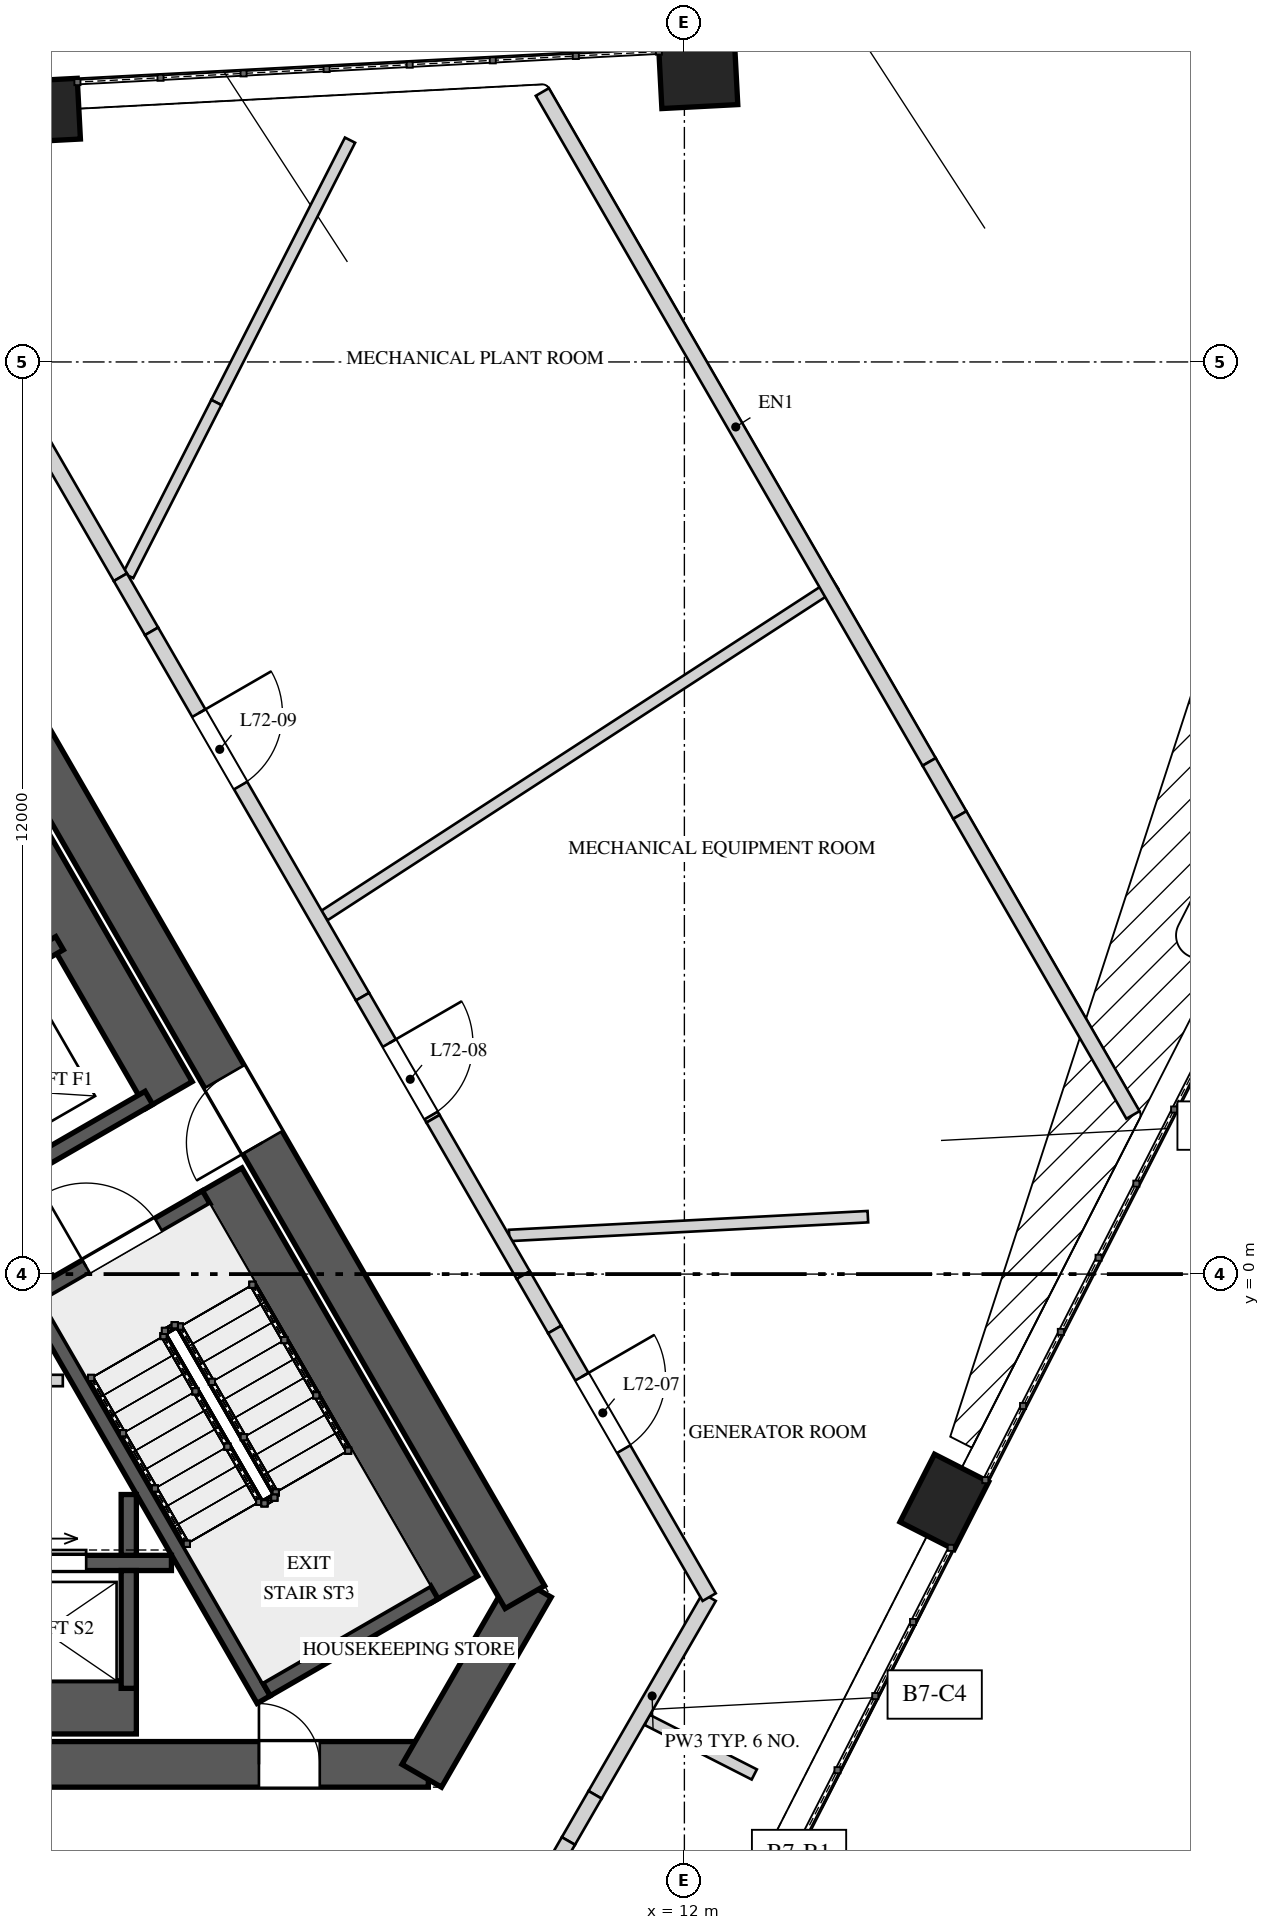
"""IFC4 building model, lengths in metres.
Left out: names, types, materials, properties, quantities, classifications, styles, units other than length and angle.
Written with IfcOpenShell. Run it as: python <this file> out.ifc"""

import sys

from ifc_helpers import new_model, si_unit, direction, frame, frame_2d, origin, origin_2d, place, context, subcontext, project, spatial, polyline, rectangle, outline, extrude, element, fill, save


model = new_model("IFC4")
c1 = context("Model", 3, precision=1e-05, world=origin(), true_north=direction((0.0, 1.0)))
c2 = subcontext(c1, "Body", "Model", "MODEL_VIEW")
j1 = project(units=[si_unit("LENGTHUNIT", "METRE"), si_unit("PLANEANGLEUNIT", "RADIAN")], contexts=[c1])
p1 = place(None, origin())
s1 = spatial("IfcSite", under=j1, at=p1, CompositionType="ELEMENT")
p2 = place(p1, origin())
s2 = spatial("IfcBuilding", under=s1, at=p2, CompositionType="ELEMENT")
p3 = place(p2, frame((0.0, 0.0, 306.4)))
s3 = spatial("IfcBuildingStorey", under=s2, at=p3, CompositionType="ELEMENT", Elevation=306.4)
p4 = place(p3, frame((-8.631, -6.45, 0.0), z_axis=(0.0, 0.0, 1.0), x_axis=(1.0, 0.0, 0.0)))
e1 = element("IfcWall", 1, at=p4, inside=s3, PredefinedType="SHEAR", context=c2, shape_type="SweptSolid", body=[
    extrude(rectangle(XDim=17.263, YDim=0.6, at=frame_2d((8.631, 0.0))), origin(), (0.0, 0.0, 1.0), 14.0),
])
p5 = place(p4, frame((6.836, 0.0, 0.0)))
e2 = element("IfcOpeningElement", 2, at=p5, cuts=e1, PredefinedType="OPENING", context=c2, shape_type="SweptSolid", body=[
    extrude(rectangle(XDim=1.0, YDim=2.4, at=frame_2d((0.5, 1.2))), frame((0.0, 0.31, 0.0), z_axis=(0.0, -1.0, 0.0), x_axis=(1.0, 0.0, 0.0)), (0.0, 0.0, 1.0), 0.62),
])
p6 = place(p4, frame((15.034, 0.0, 0.0)))
e3 = element("IfcOpeningElement", 3, at=p6, cuts=e1, PredefinedType="OPENING", context=c2, shape_type="SweptSolid", body=[
    extrude(rectangle(XDim=0.8, YDim=2.1, at=frame_2d((0.4, 1.05))), frame((0.0, 0.31, 0.0), z_axis=(0.0, -1.0, 0.0), x_axis=(1.0, 0.0, 0.0)), (0.0, 0.0, 1.0), 0.62),
])
p7 = place(p3, frame((8.545, -6.6, 0.0), z_axis=(0.0, 0.0, 1.0), x_axis=(0.499995765644, 0.866027848477, 0.0)))
e4 = element("IfcWall", 4, at=p7, inside=s3, PredefinedType="SHEAR", context=c2, shape_type="SweptSolid", body=[
    extrude(rectangle(XDim=2.887, YDim=0.6, at=frame_2d((1.443, 0.0))), origin(), (0.0, 0.0, 1.0), 14.0),
])
p8 = place(p3, frame((9.902, -4.25, 0.0), z_axis=(0.0, 0.0, 1.0), x_axis=(-0.499999536116, 0.866025671608, 0.0)))
e5 = element("IfcWall", 5, at=p8, inside=s3, PredefinedType="SHEAR", context=c2, shape_type="SweptSolid", body=[
    extrude(rectangle(XDim=17.263, YDim=0.6, at=frame_2d((8.631, 0.0))), origin(), (0.0, 0.0, 1.0), 14.0),
])
p9 = place(p8, frame((6.906, 0.0, 0.0)))
e6 = element("IfcOpeningElement", 6, at=p9, cuts=e5, PredefinedType="OPENING", context=c2, shape_type="SweptSolid", body=[
    extrude(rectangle(XDim=1.0, YDim=2.4, at=frame_2d((0.5, 1.2))), frame((0.0, 0.31, 0.0), z_axis=(0.0, -1.0, 0.0), x_axis=(1.0, 0.0, 0.0)), (0.0, 0.0, 1.0), 0.62),
])
p10 = place(p8, frame((14.567, 0.0, 0.0)))
e7 = element("IfcOpeningElement", 7, at=p10, cuts=e5, PredefinedType="OPENING", context=c2, shape_type="SweptSolid", body=[
    extrude(rectangle(XDim=0.8, YDim=2.1, at=frame_2d((0.4, 1.05))), frame((0.0, 0.31, 0.0), z_axis=(0.0, -1.0, 0.0), x_axis=(1.0, 0.0, 0.0)), (0.0, 0.0, 1.0), 0.62),
])
for number, where, z_axis, x_axis in (
    (8, (15.42, -2.997, 0.0), (0.0, 0.0, 1.0), (0.454, 0.891, 0.0)),
    (9, (12.182, 15.759, 0.0), (0.0, 0.0, 1.0), (-0.999, -0.052, 0.0)),
    (10, (3.534, 15.306, 0.0), (0.0, 0.0, 1.0), (-0.999, -0.052, 0.0)),
):
    element("IfcColumn", number, at=place(p3, frame(where, z_axis=z_axis, x_axis=x_axis)), inside=s3, PredefinedType="COLUMN", context=c2, shape_type="SweptSolid", body=[
        extrude(rectangle(XDim=1.0, YDim=0.8, at=origin_2d()), origin(), (0.0, 0.0, 1.0), 9.037),
    ])
p11 = place(p3, frame((8.976, -4.147, 0.0), z_axis=(0.0, 0.0, 1.0), x_axis=(-0.49998037582, 0.866036733513, 0.0)))
e11 = element("IfcWall", 11, at=p11, inside=s3, PredefinedType="SOLIDWALL", context=c2, shape_type="SweptSolid", body=[
    extrude(rectangle(XDim=6.2, YDim=0.7, at=frame_2d((3.1, 0.0))), origin(), (0.0, 0.0, 1.0), 13.65),
])
p12 = place(p3, frame((6.465, -5.597, 0.0), z_axis=(0.0, 0.0, 1.0), x_axis=(-0.49998037582, 0.866036733513, 0.0)))
e12 = element("IfcWall", 12, at=p12, inside=s3, PredefinedType="SOLIDWALL", context=c2, shape_type="SweptSolid", body=[
    extrude(rectangle(XDim=6.2, YDim=0.2, at=frame_2d((3.1, 0.0))), origin(), (0.0, 0.0, 1.0), 13.65),
])
p13 = place(p3, frame((6.501, -5.461, 0.0), z_axis=(0.0, 0.0, 1.0), x_axis=(0.865989465428, 0.500062241894, 0.0)))
e13 = element("IfcWall", 13, at=p13, inside=s3, PredefinedType="SOLIDWALL", context=c2, shape_type="SweptSolid", body=[
    extrude(rectangle(XDim=2.55, YDim=0.2, at=frame_2d((1.275, 0.0))), origin(), (0.0, 0.0, 1.0), 13.65),
])
p14 = place(p3, frame((3.501, -0.265, 0.0), z_axis=(0.0, 0.0, 1.0), x_axis=(0.866030925526, 0.499990435942, 0.0)))
e14 = element("IfcWall", 14, at=p14, inside=s3, PredefinedType="SOLIDWALL", context=c2, shape_type="SweptSolid", body=[
    extrude(rectangle(XDim=2.55, YDim=0.2, at=frame_2d((1.275, 0.0))), origin(), (0.0, 0.0, 1.0), 13.65),
])
p15 = place(p14, frame((0.725, 0.0, 0.0)))
e15 = element("IfcOpeningElement", 15, at=p15, cuts=e14, PredefinedType="OPENING", context=c2, shape_type="SweptSolid", body=[
    extrude(rectangle(XDim=1.1, YDim=2.4, at=frame_2d((0.55, 1.2))), frame((0.0, 0.11, 0.0), z_axis=(0.0, -1.0, 0.0), x_axis=(1.0, 0.0, 0.0)), (0.0, 0.0, 1.0), 0.22),
])
p16 = place(p3, frame((-0.71, -3.8, 0.0), z_axis=(0.0, 0.0, 1.0), x_axis=(1.0, 0.0, 0.0)))
e16 = element("IfcWall", 16, at=p16, inside=s3, PredefinedType="SOLIDWALL", context=c2, shape_type="SweptSolid", body=[
    extrude(rectangle(XDim=5.961, YDim=0.2, at=frame_2d((2.981, 0.0))), origin(), (0.0, 0.0, 1.0), 13.65),
])
p17 = place(p16, frame((1.09, 0.0, 0.0)))
e17 = element("IfcOpeningElement", 17, at=p17, cuts=e16, PredefinedType="OPENING", context=c2, shape_type="SweptSolid", body=[
    extrude(rectangle(XDim=1.1, YDim=2.1, at=frame_2d((0.55, 1.05))), frame((0.0, 0.11, 0.0), z_axis=(0.0, -1.0, 0.0), x_axis=(1.0, 0.0, 0.0)), (0.0, 0.0, 1.0), 0.22),
])
p18 = place(p16, frame((3.74, 0.0, 0.0)))
e18 = element("IfcOpeningElement", 18, at=p18, cuts=e16, PredefinedType="OPENING", context=c2, shape_type="SweptSolid", body=[
    extrude(rectangle(XDim=1.1, YDim=2.1, at=frame_2d((0.55, 1.05))), frame((0.0, 0.11, 0.0), z_axis=(0.0, -1.0, 0.0), x_axis=(1.0, 0.0, 0.0)), (0.0, 0.0, 1.0), 0.22),
])
p19 = place(p3, frame((-0.71, -5.7, 0.0), z_axis=(0.0, 0.0, 1.0), x_axis=(1.0, 0.0, 0.0)))
e19 = element("IfcWall", 19, at=p19, inside=s3, PredefinedType="SOLIDWALL", context=c2, shape_type="SweptSolid", body=[
    extrude(rectangle(XDim=5.5, YDim=0.7, at=frame_2d((2.75, 0.0))), origin(), (0.0, 0.0, 1.0), 13.65),
])
p20 = place(p3, frame((4.69, -3.9, 0.0), z_axis=(0.0, 0.0, 1.0), x_axis=(0.0, -1.0, 0.0)))
e20 = element("IfcWall", 20, at=p20, inside=s3, PredefinedType="SOLIDWALL", context=c2, shape_type="SweptSolid", body=[
    extrude(rectangle(XDim=1.55, YDim=0.2, at=frame_2d((0.775, 0.0))), origin(), (0.0, 0.0, 1.0), 13.65),
])
p21 = place(p3, frame((4.69, -2.9, 0.0), z_axis=(0.0, 0.0, 1.0), x_axis=(0.0, -1.0, 0.0)))
e21 = element("IfcWall", 21, at=p21, inside=s3, PredefinedType="SOLIDWALL", context=c2, shape_type="SweptSolid", body=[
    extrude(rectangle(XDim=0.8, YDim=0.2, at=frame_2d((0.4, 0.0))), origin(), (0.0, 0.0, 1.0), 13.65),
])
p22 = place(p3, frame((5.221, 2.356, 0.0), z_axis=(0.0, 0.0, 1.0), x_axis=(-0.500040169509, 0.866002210665, 0.0)))
e22 = element("IfcWall", 22, at=p22, inside=s3, PredefinedType="SOLIDWALL", context=c2, shape_type="SweptSolid", body=[
    extrude(rectangle(XDim=4.9, YDim=0.7, at=frame_2d((2.45, 0.0))), origin(), (0.0, 0.0, 1.0), 13.65),
])
for number, where, z_axis, x_axis in (
    (23, (2.227, 0.743, 0.0), (0.0, 0.0, 1.0), (0.866, 0.5, 0.0)),
    (24, (1.052, 2.778, 0.0), (0.0, 0.0, 1.0), (0.866, 0.5, 0.0)),
):
    element("IfcWall", number, at=place(p3, frame(where, z_axis=z_axis, x_axis=x_axis)), inside=s3, PredefinedType="SOLIDWALL", context=c2, shape_type="SweptSolid", body=[
        extrude(rectangle(XDim=3.15, YDim=0.2, at=frame_2d((1.575, 0.0))), origin(), (0.0, 0.0, 1.0), 13.65),
    ])
p23 = place(p3, frame((-4.053, -1.4, 0.0), z_axis=(0.0, 0.0, 1.0), x_axis=(1.0, 0.0, 0.0)))
e25 = element("IfcWall", 25, at=p23, inside=s3, PredefinedType="PARTITIONING", context=c2, shape_type="SweptSolid", body=[
    extrude(rectangle(XDim=7.876, YDim=0.15, at=frame_2d((3.938, 0.0))), origin(), (0.0, 0.0, 1.0), 13.65),
])
p24 = place(p3, frame((7.264, 4.718, 0.0), z_axis=(0.0, 0.0, 1.0), x_axis=(0.838671229972, 0.544638015583, 0.0)))
e26 = element("IfcWall", 26, at=p24, inside=s3, PredefinedType="PARTITIONING", context=c2, shape_type="SweptSolid", body=[
    extrude(rectangle(XDim=8.011, YDim=0.15, at=frame_2d((4.005, 0.0))), origin(), (0.0, 0.0, 1.0), 13.65),
])
p25 = place(p3, frame((7.601, 14.918, 0.0), z_axis=(0.0, 0.0, 1.0), x_axis=(-0.454033423959, -0.890984651904, 0.0)))
e27 = element("IfcWall", 27, at=p25, inside=s3, PredefinedType="PARTITIONING", context=c2, shape_type="SweptSolid", body=[
    extrude(rectangle(XDim=3.873, YDim=0.15, at=frame_2d((1.937, 0.0))), origin(), (0.0, 0.0, 1.0), 13.65),
])
p26 = place(p3, frame((5.843, 11.467, 0.0), z_axis=(0.0, 0.0, 1.0), x_axis=(-0.454001617185, -0.891000859479, 0.0)))
e28 = element("IfcWall", 28, at=p26, inside=s3, PredefinedType="PARTITIONING", context=c2, shape_type="SweptSolid", body=[
    extrude(rectangle(XDim=2.556, YDim=0.15, at=frame_2d((1.278, 0.0))), origin(), (0.0, 0.0, 1.0), 12.95),
])
p27 = place(p3, frame((9.695, 0.508, 0.0), z_axis=(0.0, 0.0, 1.0), x_axis=(0.998629649164, 0.05233377313, 0.0)))
e29 = element("IfcWall", 29, at=p27, inside=s3, PredefinedType="PARTITIONING", context=c2, shape_type="SweptSolid", body=[
    extrude(rectangle(XDim=4.726, YDim=0.15, at=frame_2d((2.363, 0.0))), origin(), (0.0, 0.0, 1.0), 13.65),
])
p28 = place(p3, frame((11.51, -5.865, 0.0), z_axis=(0.0, 0.0, 1.0), x_axis=(0.891006520779, -0.453990506431, 0.0)))
e30 = element("IfcWall", 30, at=p28, inside=s3, PredefinedType="PARTITIONING", context=c2, shape_type="SweptSolid", body=[
    extrude(rectangle(XDim=1.582, YDim=0.15, at=frame_2d((0.791, 0.0))), origin(), (0.0, 0.0, 1.0), 13.65),
])
p29 = place(p3, frame((12.326, -4.25, 0.0), z_axis=(0.0, 0.0, 1.0), x_axis=(-0.500003959331, -0.866023117852, 0.0)))
e31 = element("IfcWall", 31, at=p29, inside=s3, PredefinedType="SOLIDWALL", context=c2, shape_type="SweptSolid", body=[
    extrude(rectangle(XDim=3.003, YDim=0.2, at=frame_2d((1.501, 0.0))), origin(), (0.0, 0.0, 1.0), 13.65),
])
p30 = place(p3, frame((10.825, -6.851, 0.0), z_axis=(0.0, 0.0, 1.0), x_axis=(-0.500144223137, -0.865942120504, 0.0)))
e32 = element("IfcWall", 32, at=p30, inside=s3, PredefinedType="SOLIDWALL", context=c2, shape_type="SweptSolid", body=[
    extrude(rectangle(XDim=0.701, YDim=0.2, at=frame_2d((0.351, 0.0))), origin(), (0.0, 0.0, 1.0), 12.95),
])
p31 = place(p3, frame((10.474, -7.458, 0.0), z_axis=(0.0, 0.0, 1.0), x_axis=(-0.499929168788, -0.866066294342, 0.0)))
e33 = element("IfcWall", 33, at=p31, inside=s3, PredefinedType="SOLIDWALL", context=c2, shape_type="SweptSolid", body=[
    extrude(rectangle(XDim=1.261, YDim=0.2, at=frame_2d((0.63, 0.0))), origin(), (0.0, 0.0, 1.0), 13.65),
])
p32 = place(p3, frame((2.483, 12.8, 0.0), z_axis=(0.0, 0.0, 1.0), x_axis=(0.499982771656, -0.866035350345, 0.0)))
e34 = element("IfcWall", 34, at=p32, inside=s3, PredefinedType="SOLIDWALL", context=c2, shape_type="SweptSolid", body=[
    extrude(rectangle(XDim=4.195, YDim=0.2, at=frame_2d((2.097, 0.0))), origin(), (0.0, 0.0, 1.0), 13.65),
])
p33 = place(p3, frame((4.58, 9.167, 0.0), z_axis=(0.0, 0.0, 1.0), x_axis=(0.499945576647, -0.866056822842, 0.0)))
e35 = element("IfcWall", 35, at=p33, inside=s3, PredefinedType="SOLIDWALL", context=c2, shape_type="SweptSolid", body=[
    extrude(rectangle(XDim=0.821, YDim=0.2, at=frame_2d((0.41, 0.0))), origin(), (0.0, 0.0, 1.0), 12.95),
])
p34 = place(p3, frame((4.99, 8.457, 0.0), z_axis=(0.0, 0.0, 1.0), x_axis=(0.500004219487, -0.866022967649, 0.0)))
e36 = element("IfcWall", 36, at=p34, inside=s3, PredefinedType="SOLIDWALL", context=c2, shape_type="SweptSolid", body=[
    extrude(rectangle(XDim=5.55, YDim=0.2, at=frame_2d((2.775, 0.0))), origin(), (0.0, 0.0, 1.0), 13.65),
])
p35 = place(p34, frame((1.243, 0.0, 0.0)))
e37 = element("IfcOpeningElement", 37, at=p35, cuts=e36, PredefinedType="OPENING", context=c2, shape_type="SweptSolid", body=[
    extrude(rectangle(XDim=1.1, YDim=2.2, at=frame_2d((0.55, 1.1))), frame((0.0, 0.11, 0.0), z_axis=(0.0, -1.0, 0.0), x_axis=(1.0, 0.0, 0.0)), (0.0, 0.0, 1.0), 0.22),
])
p36 = place(p3, frame((7.765, 3.65, 0.0), z_axis=(0.0, 0.0, 1.0), x_axis=(0.500045188778, -0.865999312459, 0.0)))
e38 = element("IfcWall", 38, at=p36, inside=s3, PredefinedType="SOLIDWALL", context=c2, shape_type="SweptSolid", body=[
    extrude(outline(polyline([(0.0, 0.0), (1.855, 0.0), (1.855, 13.65), (0.807, 13.65), (0.807, 12.75), (0.0, 12.75), (0.0, 0.0)])), frame((0.0, 0.1, 0.0), z_axis=(0.0, -1.0, 0.0), x_axis=(1.0, 0.0, 0.0)), (0.0, 0.0, 1.0), 0.2),
])
p37 = place(p36, frame((0.705, 0.0, 0.0)))
e39 = element("IfcOpeningElement", 39, at=p37, cuts=e38, PredefinedType="OPENING", context=c2, shape_type="SweptSolid", body=[
    extrude(rectangle(XDim=1.1, YDim=2.2, at=frame_2d((0.55, 1.1))), frame((0.0, 0.11, 0.0), z_axis=(0.0, -1.0, 0.0), x_axis=(1.0, 0.0, 0.0)), (0.0, 0.0, 1.0), 0.22),
])
p38 = place(p3, frame((8.693, 2.043, 0.0), z_axis=(0.0, 0.0, 1.0), x_axis=(0.499953838557, -0.866052053466, 0.0)))
e40 = element("IfcWall", 40, at=p38, inside=s3, PredefinedType="SOLIDWALL", context=c2, shape_type="SweptSolid", body=[
    extrude(rectangle(XDim=2.375, YDim=0.2, at=frame_2d((1.188, 0.0))), origin(), (0.0, 0.0, 1.0), 13.65),
])
p39 = place(p3, frame((9.88, -0.013, 0.0), z_axis=(0.0, 0.0, 1.0), x_axis=(0.499952654668, -0.866052736899, 0.0)))
e41 = element("IfcWall", 41, at=p39, inside=s3, PredefinedType="SOLIDWALL", context=c2, shape_type="SweptSolid", body=[
    extrude(rectangle(XDim=0.826, YDim=0.2, at=frame_2d((0.413, 0.0))), origin(), (0.0, 0.0, 1.0), 12.95),
])
p40 = place(p3, frame((10.293, -0.729, 0.0), z_axis=(0.0, 0.0, 1.0), x_axis=(0.50002046505, -0.86601358796, 0.0)))
e42 = element("IfcWall", 42, at=p40, inside=s3, PredefinedType="SOLIDWALL", context=c2, shape_type="SweptSolid", body=[
    extrude(rectangle(XDim=4.066, YDim=0.2, at=frame_2d((2.033, 0.0))), origin(), (0.0, 0.0, 1.0), 13.65),
])
p41 = place(p40, frame((0.717, 0.0, 0.0)))
e43 = element("IfcOpeningElement", 43, at=p41, cuts=e42, PredefinedType="OPENING", context=c2, shape_type="SweptSolid", body=[
    extrude(rectangle(XDim=1.1, YDim=2.2, at=frame_2d((0.55, 1.1))), frame((0.0, 0.11, 0.0), z_axis=(0.0, -1.0, 0.0), x_axis=(1.0, 0.0, 0.0)), (0.0, 0.0, 1.0), 0.22),
])
p42 = place(p3, frame((10.132, 15.552, 0.0), z_axis=(0.0, 0.0, 1.0), x_axis=(0.499993797725, -0.86602898464, 0.0)))
e44 = element("IfcWall", 44, at=p42, inside=s3, PredefinedType="SOLIDWALL", context=c2, shape_type="SweptSolid", body=[
    extrude(rectangle(XDim=10.177, YDim=0.2, at=frame_2d((5.088, 0.0))), origin(), (0.0, 0.0, 1.0), 13.65),
])
p43 = place(p3, frame((15.22, 6.738, 0.0), z_axis=(0.0, 0.0, 1.0), x_axis=(0.500141487433, -0.865943700565, 0.0)))
e45 = element("IfcWall", 45, at=p43, inside=s3, PredefinedType="SOLIDWALL", context=c2, shape_type="SweptSolid", body=[
    extrude(rectangle(XDim=0.807, YDim=0.2, at=frame_2d((0.403, 0.0))), origin(), (0.0, 0.0, 1.0), 12.75),
])
p44 = place(p3, frame((15.624, 6.039, 0.0), z_axis=(0.0, 0.0, 1.0), x_axis=(0.49999457255, -0.866028537301, 0.0)))
e46 = element("IfcWall", 46, at=p44, inside=s3, PredefinedType="SOLIDWALL", context=c2, shape_type="SweptSolid", body=[
    extrude(rectangle(XDim=4.556, YDim=0.2, at=frame_2d((2.278, 0.0))), origin(), (0.0, 0.0, 1.0), 13.65),
])
p45 = place(p15, origin())
e47 = element("IfcDoor", 47, at=p45, inside=s3, OperationType="SINGLE_SWING_RIGHT", PredefinedType="DOOR", context=c2, shape_type="SweptSolid", body=[
    extrude(rectangle(XDim=1.1, YDim=2.4, at=frame_2d((0.55, 1.2))), frame((0.0, 0.025, 0.0), z_axis=(0.0, -1.0, 0.0), x_axis=(1.0, 0.0, 0.0)), (0.0, 0.0, 1.0), 0.05),
])
fill(e15, e47)
p46 = place(p18, origin())
e48 = element("IfcDoor", 48, at=p46, inside=s3, OperationType="SLIDING_TO_RIGHT", PredefinedType="DOOR", context=c2, shape_type="SweptSolid", body=[
    extrude(rectangle(XDim=1.1, YDim=2.1, at=frame_2d((0.55, 1.05))), frame((0.0, 0.025, 0.0), z_axis=(0.0, -1.0, 0.0), x_axis=(1.0, 0.0, 0.0)), (0.0, 0.0, 1.0), 0.05),
])
fill(e18, e48)
p47 = place(p9, origin())
e49 = element("IfcDoor", 49, at=p47, inside=s3, OperationType="SINGLE_SWING_RIGHT", PredefinedType="DOOR", context=c2, shape_type="SweptSolid", body=[
    extrude(rectangle(XDim=1.0, YDim=2.4, at=frame_2d((0.5, 1.2))), frame((0.0, 0.025, 0.0), z_axis=(0.0, -1.0, 0.0), x_axis=(1.0, 0.0, 0.0)), (0.0, 0.0, 1.0), 0.05),
])
fill(e6, e49)
p48 = place(p6, origin())
e50 = element("IfcDoor", 50, at=p48, inside=s3, OperationType="SINGLE_SWING_LEFT", PredefinedType="DOOR", context=c2, shape_type="SweptSolid", body=[
    extrude(rectangle(XDim=0.8, YDim=2.1, at=frame_2d((0.4, 1.05))), frame((0.0, 0.025, 0.0), z_axis=(0.0, -1.0, 0.0), x_axis=(1.0, 0.0, 0.0)), (0.0, 0.0, 1.0), 0.05),
])
fill(e3, e50)
p49 = place(p41, origin())
e51 = element("IfcDoor", 51, at=p49, inside=s3, OperationType="SINGLE_SWING_LEFT", PredefinedType="DOOR", context=c2, shape_type="SweptSolid", body=[
    extrude(rectangle(XDim=1.1, YDim=2.2, at=frame_2d((0.55, 1.1))), frame((0.0, 0.025, 0.0), z_axis=(0.0, -1.0, 0.0), x_axis=(1.0, 0.0, 0.0)), (0.0, 0.0, 1.0), 0.05),
])
fill(e43, e51)
p50 = place(p37, origin())
e52 = element("IfcDoor", 52, at=p50, inside=s3, OperationType="SINGLE_SWING_RIGHT", PredefinedType="DOOR", context=c2, shape_type="SweptSolid", body=[
    extrude(rectangle(XDim=1.1, YDim=2.2, at=frame_2d((0.55, 1.1))), frame((0.0, 0.025, 0.0), z_axis=(0.0, -1.0, 0.0), x_axis=(1.0, 0.0, 0.0)), (0.0, 0.0, 1.0), 0.05),
])
fill(e39, e52)
p51 = place(p35, origin())
e53 = element("IfcDoor", 53, at=p51, inside=s3, OperationType="SINGLE_SWING_LEFT", PredefinedType="DOOR", context=c2, shape_type="SweptSolid", body=[
    extrude(rectangle(XDim=1.1, YDim=2.2, at=frame_2d((0.55, 1.1))), frame((0.0, 0.025, 0.0), z_axis=(0.0, -1.0, 0.0), x_axis=(1.0, 0.0, 0.0)), (0.0, 0.0, 1.0), 0.05),
])
fill(e37, e53)
save(model, sys.argv[1])
